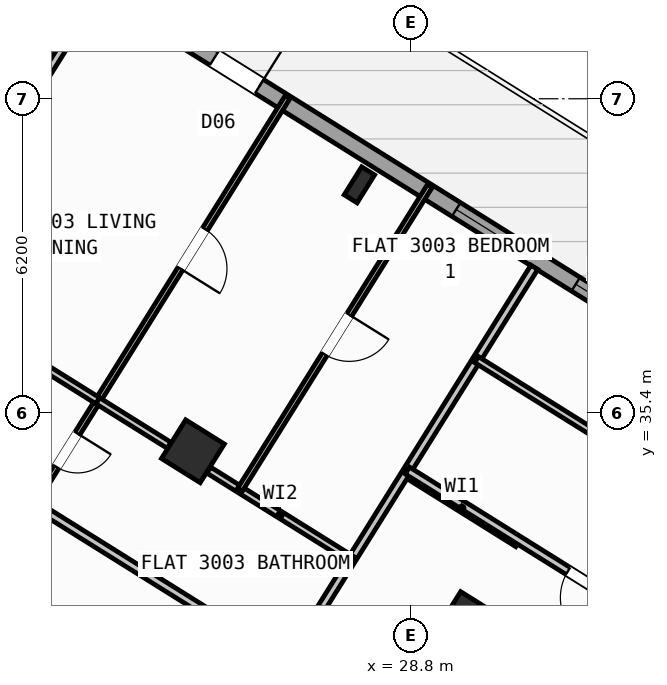
"""IFC4 building model, lengths in metres.
Left out: names, types, materials, properties, quantities, classifications, styles, units other than length and angle.
Written with IfcOpenShell. Run it as: python <this file> out.ifc"""

import sys

from ifc_helpers import new_model, si_unit, direction, frame, frame_2d, origin, origin_2d, place, context, subcontext, project, spatial, rectangle, hollow_rectangle, i_section, extrude, source, transform, mapped, element, fill, save


model = new_model("IFC4")
c1 = context("Model", 3, precision=1e-05, world=origin(), true_north=direction((0.0, 1.0)))
c2 = subcontext(c1, "Body", "Model", "MODEL_VIEW")
j1 = project(units=[si_unit("LENGTHUNIT", "METRE"), si_unit("PLANEANGLEUNIT", "RADIAN")], contexts=[c1])
p1 = place(None, origin())
s1 = spatial("IfcSite", under=j1, at=p1, CompositionType="ELEMENT")
p2 = place(p1, origin())
s2 = spatial("IfcBuilding", under=s1, at=p2, CompositionType="ELEMENT")
p3 = place(p2, frame((0.0, 0.0, 119.7)))
s3 = spatial("IfcBuildingStorey", under=s2, at=p3, CompositionType="ELEMENT", Elevation=119.7)
m1 = source(origin(), c2, "Body", "SweptSolid", [
    extrude(hollow_rectangle(XDim=0.9, YDim=0.9, WallThickness=0.036, at=origin_2d()), origin(), (0.0, 0.0, 1.0), 3.6),
])
p4 = place(p3, frame((29.928, 31.251, 0.0), z_axis=(0.0, 0.0, 1.0), x_axis=(-0.848048096156, 0.529919264233, 0.0)))
e1 = element("IfcColumn", 1, at=p4, inside=s3, PredefinedType="COLUMN", context=c2, shape_type="MappedRepresentation", body=[
    mapped(m1, transform((0.0, 0.0, 0.0), scale=1.0)),
])
m2 = source(origin(), c2, "Body", "SweptSolid", [
    extrude(i_section(OverallWidth=0.3, OverallDepth=0.65, WebThickness=0.016, FlangeThickness=0.031, at=origin_2d()), origin(), (0.0, 0.0, 1.0), 3.6),
])
p5 = place(p3, frame((27.786, 39.901, 0.0), z_axis=(0.0, 0.0, 1.0), x_axis=(-0.848048096156, 0.529919264233, 0.0)))
e2 = element("IfcColumn", 2, at=p5, inside=s3, PredefinedType="COLUMN", context=c2, shape_type="MappedRepresentation", body=[
    mapped(m2, transform((0.0, 0.0, 0.0), scale=1.0)),
])
p6 = place(p3, frame((24.5, 34.643, 0.0), z_axis=(0.0, 0.0, 1.0), x_axis=(-0.848048096156, 0.529919264233, 0.0)))
e3 = element("IfcColumn", 3, at=p6, inside=s3, PredefinedType="COLUMN", context=c2, shape_type="MappedRepresentation", body=[
    mapped(m1, transform((0.0, 0.0, 0.0), scale=1.0)),
])
p7 = place(p3, frame((17.424, 47.083, 0.0), z_axis=(0.0, 0.0, 1.0), x_axis=(0.848049927979, -0.529916332693, 0.0)))
e4 = element("IfcWall", 4, at=p7, inside=s3, PredefinedType="STANDARD", context=c2, shape_type="SweptSolid", body=[
    extrude(rectangle(XDim=29.223, YDim=0.32, at=frame_2d((14.612, 0.0))), origin(), (0.0, 0.0, 1.0), 3.35),
])
p8 = place(p7, frame((8.839, 0.0, 0.0)))
e5 = element("IfcOpeningElement", 5, at=p8, cuts=e4, PredefinedType="OPENING", context=c2, shape_type="SweptSolid", body=[
    extrude(rectangle(XDim=1.05, YDim=2.15, at=frame_2d((0.525, 1.075))), frame((0.0, 0.17, 0.0), z_axis=(0.0, -1.0, 0.0), x_axis=(1.0, 0.0, 0.0)), (0.0, 0.0, 1.0), 0.34),
])
p9 = place(p7, frame((0.719, 0.0, 0.85)))
e6 = element("IfcOpeningElement", 6, at=p9, cuts=e4, PredefinedType="OPENING", context=c2, shape_type="SweptSolid", body=[
    extrude(rectangle(XDim=1.8, YDim=1.5, at=frame_2d((0.9, 0.75))), frame((0.0, 0.17, 0.0), z_axis=(0.0, -1.0, 0.0), x_axis=(1.0, 0.0, 0.0)), (0.0, 0.0, 1.0), 0.34),
])
p10 = place(p7, frame((3.981, 0.0, 0.85)))
e7 = element("IfcOpeningElement", 7, at=p10, cuts=e4, PredefinedType="OPENING", context=c2, shape_type="SweptSolid", body=[
    extrude(rectangle(XDim=1.5, YDim=1.5, at=frame_2d((0.75, 0.75))), frame((0.0, 0.17, 0.0), z_axis=(0.0, -1.0, 0.0), x_axis=(1.0, 0.0, 0.0)), (0.0, 0.0, 1.0), 0.34),
])
p11 = place(p7, frame((7.021, 0.0, 0.95)))
e8 = element("IfcOpeningElement", 8, at=p11, cuts=e4, PredefinedType="OPENING", context=c2, shape_type="SweptSolid", body=[
    extrude(rectangle(XDim=1.2, YDim=1.4, at=frame_2d((0.6, 0.7))), frame((0.0, 0.17, 0.0), z_axis=(0.0, -1.0, 0.0), x_axis=(1.0, 0.0, 0.0)), (0.0, 0.0, 1.0), 0.34),
])
p12 = place(p7, frame((14.471, 0.0, 0.95)))
e9 = element("IfcOpeningElement", 9, at=p12, cuts=e4, PredefinedType="OPENING", context=c2, shape_type="SweptSolid", body=[
    extrude(rectangle(XDim=1.2, YDim=1.4, at=frame_2d((0.6, 0.7))), frame((0.0, 0.17, 0.0), z_axis=(0.0, -1.0, 0.0), x_axis=(1.0, 0.0, 0.0)), (0.0, 0.0, 1.0), 0.34),
])
p13 = place(p7, frame((17.254, 0.0, 1.0)))
e10 = element("IfcOpeningElement", 10, at=p13, cuts=e4, PredefinedType="OPENING", context=c2, shape_type="SweptSolid", body=[
    extrude(rectangle(XDim=0.9, YDim=1.25, at=frame_2d((0.45, 0.625))), frame((0.0, 0.17, 0.0), z_axis=(0.0, -1.0, 0.0), x_axis=(1.0, 0.0, 0.0)), (0.0, 0.0, 1.0), 0.34),
])
p14 = place(p7, frame((20.764, 0.0, 0.8)))
e11 = element("IfcOpeningElement", 11, at=p14, cuts=e4, PredefinedType="OPENING", context=c2, shape_type="SweptSolid", body=[
    extrude(rectangle(XDim=2.1, YDim=1.55, at=frame_2d((1.05, 0.775))), frame((0.0, 0.17, 0.0), z_axis=(0.0, -1.0, 0.0), x_axis=(1.0, 0.0, 0.0)), (0.0, 0.0, 1.0), 0.34),
])
p15 = place(p7, frame((25.403, 0.0, 0.8)))
e12 = element("IfcOpeningElement", 12, at=p15, cuts=e4, PredefinedType="OPENING", context=c2, shape_type="SweptSolid", body=[
    extrude(rectangle(XDim=2.1, YDim=1.55, at=frame_2d((1.05, 0.775))), frame((0.0, 0.17, 0.0), z_axis=(0.0, -1.0, 0.0), x_axis=(1.0, 0.0, 0.0)), (0.0, 0.0, 1.0), 0.34),
])
p16 = place(p3, frame((30.914, 32.829, 0.0), z_axis=(0.0, 0.0, 1.0), x_axis=(-0.848008813643, 0.529982124211, 0.0)))
e13 = element("IfcWall", 13, at=p16, inside=s3, PredefinedType="PARTITIONING", context=c2, shape_type="SweptSolid", body=[
    extrude(rectangle(XDim=2.61, YDim=0.16, at=frame_2d((1.305, 0.0))), origin(), (0.0, 0.0, 1.0), 3.34),
])
p17 = place(p3, frame((31.239, 38.274, 0.0), z_axis=(0.0, 0.0, 1.0), x_axis=(-0.529920220799, -0.848047498427, 0.0)))
e14 = element("IfcWall", 14, at=p17, inside=s3, PredefinedType="PARTITIONING", context=c2, shape_type="SweptSolid", body=[
    extrude(rectangle(XDim=9.2, YDim=0.16, at=frame_2d((4.6, 0.0))), origin(), (0.0, 0.0, 1.0), 3.34),
])
p18 = place(p3, frame((26.363, 30.472, 0.0), z_axis=(0.0, 0.0, 1.0), x_axis=(-0.848052408131, 0.529912363569, 0.0)))
e15 = element("IfcWall", 15, at=p18, inside=s3, PredefinedType="PARTITIONING", context=c2, shape_type="SweptSolid", body=[
    extrude(rectangle(XDim=16.73, YDim=0.16, at=frame_2d((8.365, 0.0))), origin(), (0.0, 0.0, 1.0), 3.34),
])
p19 = place(p18, frame((7.55, 0.0, 0.0)))
e16 = element("IfcOpeningElement", 16, at=p19, cuts=e15, PredefinedType="OPENING", context=c2, shape_type="SweptSolid", body=[
    extrude(rectangle(XDim=1.0, YDim=2.1, at=frame_2d((0.5, 1.05))), frame((0.0, 0.09, 0.0), z_axis=(0.0, -1.0, 0.0), x_axis=(1.0, 0.0, 0.0)), (0.0, 0.0, 1.0), 0.18),
])
p20 = place(p18, frame((11.14, 0.0, 0.0)))
e17 = element("IfcOpeningElement", 17, at=p20, cuts=e15, PredefinedType="OPENING", context=c2, shape_type="SweptSolid", body=[
    extrude(rectangle(XDim=1.0, YDim=2.1, at=frame_2d((0.5, 1.05))), frame((0.0, 0.09, 0.0), z_axis=(0.0, -1.0, 0.0), x_axis=(1.0, 0.0, 0.0)), (0.0, 0.0, 1.0), 0.18),
])
p21 = place(p3, frame((25.198, 28.606, 0.0), z_axis=(0.0, 0.0, 1.0), x_axis=(-0.848052408131, 0.529912363569, 0.0)))
e18 = element("IfcWall", 18, at=p21, inside=s3, PredefinedType="PARTITIONING", context=c2, shape_type="SweptSolid", body=[
    extrude(rectangle(XDim=16.73, YDim=0.16, at=frame_2d((8.365, 0.0))), origin(), (0.0, 0.0, 1.0), 3.34),
])
p22 = place(p21, frame((2.22, 0.0, 0.0)))
e19 = element("IfcOpeningElement", 19, at=p22, cuts=e18, PredefinedType="OPENING", context=c2, shape_type="SweptSolid", body=[
    extrude(rectangle(XDim=0.86, YDim=2.05, at=frame_2d((0.43, 1.025))), frame((0.0, 0.09, 0.0), z_axis=(0.0, -1.0, 0.0), x_axis=(1.0, 0.0, 0.0)), (0.0, 0.0, 1.0), 0.18),
])
p23 = place(p21, frame((12.084, 0.0, 0.0)))
e20 = element("IfcOpeningElement", 20, at=p23, cuts=e18, PredefinedType="OPENING", context=c2, shape_type="SweptSolid", body=[
    extrude(rectangle(XDim=1.0, YDim=2.1, at=frame_2d((0.5, 1.05))), frame((0.0, 0.09, 0.0), z_axis=(0.0, -1.0, 0.0), x_axis=(1.0, 0.0, 0.0)), (0.0, 0.0, 1.0), 0.18),
])
p24 = place(p3, frame((22.18, 43.006, 0.0), z_axis=(0.0, 0.0, 1.0), x_axis=(-0.529913610495, -0.848051628978, 0.0)))
e21 = element("IfcWall", 21, at=p24, inside=s3, PredefinedType="PARTITIONING", context=c2, shape_type="SweptSolid", body=[
    extrude(rectangle(XDim=5.401, YDim=0.16, at=frame_2d((2.7, 0.0))), origin(), (0.0, 0.0, 1.0), 2.775),
])
p25 = place(p3, frame((26.37, 41.635, 0.0), z_axis=(0.0, 0.0, 1.0), x_axis=(-0.529917830441, -0.848048992088, 0.0)))
e22 = element("IfcWall", 22, at=p25, inside=s3, PredefinedType="PARTITIONING", context=c2, shape_type="SweptSolid", body=[
    extrude(rectangle(XDim=9.47, YDim=0.11, at=frame_2d((4.735, 0.0))), origin(), (0.0, 0.0, 1.0), 2.995),
])
p26 = place(p25, frame((7.83, 0.0, 0.0)))
e23 = element("IfcOpeningElement", 23, at=p26, cuts=e22, PredefinedType="OPENING", context=c2, shape_type="SweptSolid", body=[
    extrude(rectangle(XDim=0.78, YDim=2.05, at=frame_2d((0.39, 1.025))), frame((0.0, 0.065, 0.0), z_axis=(0.0, -1.0, 0.0), x_axis=(1.0, 0.0, 0.0)), (0.0, 0.0, 1.0), 0.13),
])
p27 = place(p25, frame((3.075, 0.0, 0.0)))
e24 = element("IfcOpeningElement", 24, at=p27, cuts=e22, PredefinedType="OPENING", context=c2, shape_type="SweptSolid", body=[
    extrude(rectangle(XDim=0.92, YDim=2.08, at=frame_2d((0.46, 1.04))), frame((0.0, 0.065, 0.0), z_axis=(0.0, -1.0, 0.0), x_axis=(1.0, 0.0, 0.0)), (0.0, 0.0, 1.0), 0.13),
])
p28 = place(p3, frame((22.623, 35.639, 0.0), z_axis=(0.0, 0.0, 1.0), x_axis=(-0.8480485946, 0.529918466555, 0.0)))
e25 = element("IfcWall", 25, at=p28, inside=s3, PredefinedType="PLUMBINGWALL", context=c2, shape_type="SweptSolid", body=[
    extrude(rectangle(XDim=3.818, YDim=0.14, at=frame_2d((1.909, 0.0))), origin(), (0.0, 0.0, 1.0), 2.775),
])
p29 = place(p28, frame((1.68, 0.0, 0.0)))
e26 = element("IfcOpeningElement", 26, at=p29, cuts=e25, PredefinedType="OPENING", context=c2, shape_type="SweptSolid", body=[
    extrude(rectangle(XDim=0.92, YDim=2.08, at=frame_2d((0.46, 1.04))), frame((0.0, 0.08, 0.0), z_axis=(0.0, -1.0, 0.0), x_axis=(1.0, 0.0, 0.0)), (0.0, 0.0, 1.0), 0.16),
])
p30 = place(p3, frame((27.635, 32.507, 0.0), z_axis=(0.0, 0.0, 1.0), x_axis=(-0.848064240775, 0.529893426567, 0.0)))
e27 = element("IfcWall", 27, at=p30, inside=s3, PredefinedType="PLUMBINGWALL", context=c2, shape_type="SweptSolid", body=[
    extrude(rectangle(XDim=3.328, YDim=0.14, at=frame_2d((1.664, 0.0))), origin(), (0.0, 0.0, 1.0), 2.775),
])
p31 = place(p3, frame((24.029, 34.76, 0.0), z_axis=(0.0, 0.0, 1.0), x_axis=(-0.848023120795, 0.529959231071, 0.0)))
e28 = element("IfcWall", 28, at=p31, inside=s3, PredefinedType="PLUMBINGWALL", context=c2, shape_type="SweptSolid", body=[
    extrude(rectangle(XDim=1.658, YDim=0.14, at=frame_2d((0.829, 0.0))), origin(), (0.0, 0.0, 1.0), 2.775),
])
p32 = place(p3, frame((29.177, 39.881, 0.0), z_axis=(0.0, 0.0, 1.0), x_axis=(-0.529930649952, -0.848040981463, 0.0)))
e29 = element("IfcWall", 29, at=p32, inside=s3, PredefinedType="PARTITIONING", context=c2, shape_type="SweptSolid", body=[
    extrude(rectangle(XDim=7.07, YDim=0.11, at=frame_2d((3.535, 0.0))), origin(), (0.0, 0.0, 1.0), 3.34),
])
p33 = place(p32, frame((3.0, 0.0, 0.0)))
e30 = element("IfcOpeningElement", 30, at=p33, cuts=e29, PredefinedType="OPENING", context=c2, shape_type="SweptSolid", body=[
    extrude(rectangle(XDim=0.92, YDim=2.08, at=frame_2d((0.46, 1.04))), frame((0.0, 0.065, 0.0), z_axis=(0.0, -1.0, 0.0), x_axis=(1.0, 0.0, 0.0)), (0.0, 0.0, 1.0), 0.13),
])
p34 = place(p3, frame((41.936, 26.012, 0.0), z_axis=(0.0, 0.0, 1.0), x_axis=(-0.848051154596, 0.529914369676, 0.0)))
e31 = element("IfcWall", 31, at=p34, inside=s3, PredefinedType="PARTITIONING", context=c2, shape_type="SweptSolid", body=[
    extrude(rectangle(XDim=15.57, YDim=0.16, at=frame_2d((7.785, 0.0))), origin(), (0.0, 0.0, 1.0), 3.34),
])
p35 = place(p34, frame((10.83, 0.0, 0.0)))
e32 = element("IfcOpeningElement", 32, at=p35, cuts=e31, PredefinedType="OPENING", context=c2, shape_type="SweptSolid", body=[
    extrude(rectangle(XDim=1.0, YDim=2.1, at=frame_2d((0.5, 1.05))), frame((0.0, 0.09, 0.0), z_axis=(0.0, -1.0, 0.0), x_axis=(1.0, 0.0, 0.0)), (0.0, 0.0, 1.0), 0.18),
])
p36 = place(p3, frame((42.226, 28.873, 0.0), z_axis=(0.0, 0.0, 1.0), x_axis=(-0.848049134363, 0.529917602752, 0.0)))
e33 = element("IfcWall", 33, at=p36, inside=s3, PredefinedType="PLUMBINGWALL", context=c2, shape_type="SweptSolid", body=[
    extrude(rectangle(XDim=14.3, YDim=0.14, at=frame_2d((7.15, 0.0))), origin(), (0.0, 0.0, 1.0), 3.34),
])
p37 = place(p36, frame((9.57, 0.0, 0.0)))
e34 = element("IfcOpeningElement", 34, at=p37, cuts=e33, PredefinedType="OPENING", context=c2, shape_type="SweptSolid", body=[
    extrude(rectangle(XDim=0.92, YDim=2.08, at=frame_2d((0.46, 1.04))), frame((0.0, 0.08, 0.0), z_axis=(0.0, -1.0, 0.0), x_axis=(1.0, 0.0, 0.0)), (0.0, 0.0, 1.0), 0.16),
])
m3 = source(origin(), c2, "Body", "SweptSolid", [
    extrude(rectangle(XDim=1.05, YDim=2.15, at=frame_2d((0.525, 1.075))), frame((0.0, 0.025, 0.0), z_axis=(0.0, -1.0, 0.0), x_axis=(1.0, 0.0, 0.0)), (0.0, 0.0, 1.0), 0.05),
])
p38 = place(p8, origin())
e35 = element("IfcDoor", 35, at=p38, inside=s3, OperationType="SINGLE_SWING_RIGHT", PredefinedType="DOOR", context=c2, shape_type="MappedRepresentation", body=[
    mapped(m3, transform((0.0, 0.0, 0.0), scale=1.0)),
])
fill(e5, e35)
m4 = source(origin(), c2, "Body", "SweptSolid", [
    extrude(rectangle(XDim=1.2, YDim=1.4, at=frame_2d((0.6, 0.7))), frame((0.0, 0.03, 0.0), z_axis=(0.0, -1.0, 0.0), x_axis=(1.0, 0.0, 0.0)), (0.0, 0.0, 1.0), 0.06),
])
p39 = place(p12, origin())
e36 = element("IfcWindow", 36, at=p39, inside=s3, PartitioningType="SINGLE_PANEL", PredefinedType="WINDOW", context=c2, shape_type="MappedRepresentation", body=[
    mapped(m4, transform((0.0, 0.0, 0.0), scale=1.0)),
])
fill(e9, e36)
m5 = source(origin(), c2, "Body", "SweptSolid", [
    extrude(rectangle(XDim=0.9, YDim=1.25, at=frame_2d((0.45, 0.625))), frame((0.0, 0.03, 0.0), z_axis=(0.0, -1.0, 0.0), x_axis=(1.0, 0.0, 0.0)), (0.0, 0.0, 1.0), 0.06),
])
p40 = place(p13, origin())
e37 = element("IfcWindow", 37, at=p40, inside=s3, PartitioningType="SINGLE_PANEL", PredefinedType="WINDOW", context=c2, shape_type="MappedRepresentation", body=[
    mapped(m5, transform((0.0, 0.0, 0.0), scale=1.0)),
])
fill(e10, e37)
m6 = source(origin(), c2, "Body", "SweptSolid", [
    extrude(rectangle(XDim=0.78, YDim=2.05, at=frame_2d((0.39, 1.025))), frame((0.0, 0.025, 0.0), z_axis=(0.0, -1.0, 0.0), x_axis=(1.0, 0.0, 0.0)), (0.0, 0.0, 1.0), 0.05),
])
p41 = place(p26, origin())
e38 = element("IfcDoor", 38, at=p41, inside=s3, OperationType="SINGLE_SWING_LEFT", PredefinedType="DOOR", context=c2, shape_type="MappedRepresentation", body=[
    mapped(m6, transform((0.0, 0.0, 0.0), scale=1.0)),
])
fill(e23, e38)
m7 = source(origin(), c2, "Body", "SweptSolid", [
    extrude(rectangle(XDim=0.92, YDim=2.08, at=frame_2d((0.46, 1.04))), frame((0.0, 0.025, 0.0), z_axis=(0.0, -1.0, 0.0), x_axis=(1.0, 0.0, 0.0)), (0.0, 0.0, 1.0), 0.05),
])
p42 = place(p27, origin())
e39 = element("IfcDoor", 39, at=p42, inside=s3, OperationType="SINGLE_SWING_RIGHT", PredefinedType="DOOR", context=c2, shape_type="MappedRepresentation", body=[
    mapped(m7, transform((0.0, 0.0, 0.0), scale=1.0)),
])
fill(e24, e39)
p43 = place(p33, origin())
e40 = element("IfcDoor", 40, at=p43, inside=s3, OperationType="SINGLE_SWING_LEFT", PredefinedType="DOOR", context=c2, shape_type="MappedRepresentation", body=[
    mapped(m7, transform((0.0, 0.0, 0.0), scale=1.0)),
])
fill(e30, e40)
m8 = source(origin(), c2, "Body", "SweptSolid", [
    extrude(rectangle(XDim=1.0, YDim=2.1, at=frame_2d((0.5, 1.05))), frame((0.0, 0.025, 0.0), z_axis=(0.0, -1.0, 0.0), x_axis=(1.0, 0.0, 0.0)), (0.0, 0.0, 1.0), 0.05),
])
p44 = place(p35, origin())
e41 = element("IfcDoor", 41, at=p44, inside=s3, OperationType="SINGLE_SWING_LEFT", PredefinedType="DOOR", context=c2, shape_type="MappedRepresentation", body=[
    mapped(m8, transform((0.0, 0.0, 0.0), scale=1.0)),
])
fill(e32, e41)
save(model, sys.argv[1])
